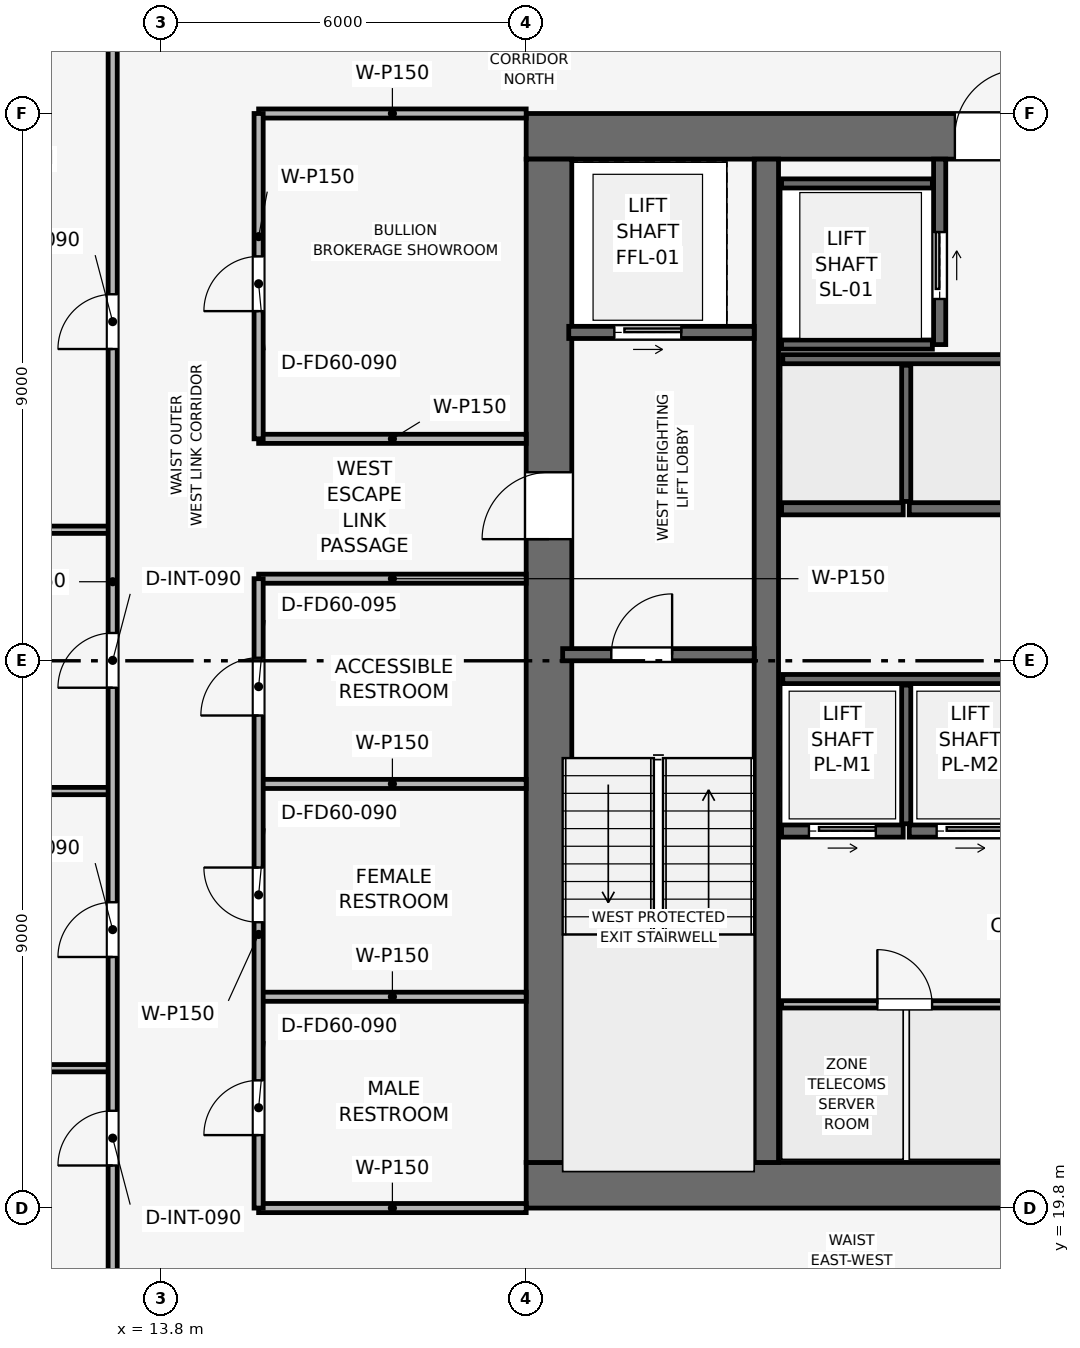
"""IFC4 building model, lengths in metres.
Left out: names, types, materials, properties, quantities, classifications, styles, units other than length and angle.
Written with IfcOpenShell. Run it as: python <this file> out.ifc"""

import sys

from ifc_helpers import new_model, si_unit, direction, frame, frame_2d, origin, place, context, subcontext, project, spatial, rectangle, extrude, element, fill, save


model = new_model("IFC4")
c1 = context("Model", 3, precision=1e-05, world=origin(), true_north=direction((0.0, 1.0)))
c2 = subcontext(c1, "Body", "Model", "MODEL_VIEW")
j1 = project(units=[si_unit("LENGTHUNIT", "METRE"), si_unit("PLANEANGLEUNIT", "RADIAN")], contexts=[c1])
p1 = place(None, origin())
s1 = spatial("IfcSite", under=j1, at=p1, CompositionType="ELEMENT")
p2 = place(p1, origin())
s2 = spatial("IfcBuilding", under=s1, at=p2, CompositionType="ELEMENT")
p3 = place(p2, frame((0.0, 0.0, 229.95)))
s3 = spatial("IfcBuildingStorey", under=s2, at=p3, CompositionType="ELEMENT", Elevation=229.95)
p4 = place(p3, frame((19.8, 20.175, 0.0), z_axis=(0.0, 0.0, 1.0), x_axis=(1.0, 0.0, 0.0)))
e1 = element("IfcWall", 1, at=p4, inside=s3, PredefinedType="SHEAR", context=c2, shape_type="SweptSolid", body=[
    extrude(rectangle(XDim=18.0, YDim=0.75, at=frame_2d((9.0, 0.0))), origin(), (0.0, 0.0, 1.0), 3.75),
])
p5 = place(p4, frame((8.4, 0.0, 0.0)))
e2 = element("IfcOpeningElement", 2, at=p5, cuts=e1, PredefinedType="OPENING", context=c2, shape_type="SweptSolid", body=[
    extrude(rectangle(XDim=1.2, YDim=2.2, at=frame_2d((0.6, 1.1))), frame((0.0, 0.385, 0.0), z_axis=(0.0, -1.0, 0.0), x_axis=(1.0, 0.0, 0.0)), (0.0, 0.0, 1.0), 0.77),
])
p6 = place(p3, frame((19.8, 37.425, 0.0), z_axis=(0.0, 0.0, 1.0), x_axis=(1.0, 0.0, 0.0)))
e3 = element("IfcWall", 3, at=p6, inside=s3, PredefinedType="SHEAR", context=c2, shape_type="SweptSolid", body=[
    extrude(rectangle(XDim=18.0, YDim=0.75, at=frame_2d((9.0, 0.0))), origin(), (0.0, 0.0, 1.0), 3.75),
])
p7 = place(p6, frame((7.05, 0.0, 0.0)))
e4 = element("IfcOpeningElement", 4, at=p7, cuts=e3, PredefinedType="OPENING", context=c2, shape_type="SweptSolid", body=[
    extrude(rectangle(XDim=1.1, YDim=2.15, at=frame_2d((0.55, 1.075))), frame((0.0, 0.385, 0.0), z_axis=(0.0, -1.0, 0.0), x_axis=(1.0, 0.0, 0.0)), (0.0, 0.0, 1.0), 0.77),
])
p8 = place(p3, frame((20.175, 20.55, 0.0), z_axis=(0.0, 0.0, 1.0), x_axis=(0.0, 1.0, 0.0)))
e5 = element("IfcWall", 5, at=p8, inside=s3, PredefinedType="SHEAR", context=c2, shape_type="SweptSolid", body=[
    extrude(rectangle(XDim=16.5, YDim=0.75, at=frame_2d((8.25, 0.0))), origin(), (0.0, 0.0, 1.0), 3.75),
])
p9 = place(p8, frame((10.25, 0.0, 0.0)))
e6 = element("IfcOpeningElement", 6, at=p9, cuts=e5, PredefinedType="OPENING", context=c2, shape_type="SweptSolid", body=[
    extrude(rectangle(XDim=1.1, YDim=2.15, at=frame_2d((0.55, 1.075))), frame((0.0, 0.385, 0.0), z_axis=(0.0, -1.0, 0.0), x_axis=(1.0, 0.0, 0.0)), (0.0, 0.0, 1.0), 0.77),
])
p10 = place(p3, frame((23.75, 20.55, 0.0), z_axis=(0.0, 0.0, 1.0), x_axis=(0.0, 1.0, 0.0)))
e7 = element("IfcWall", 7, at=p10, inside=s3, PredefinedType="SHEAR", context=c2, shape_type="SweptSolid", body=[
    extrude(rectangle(XDim=16.5, YDim=0.4, at=frame_2d((8.25, 0.0))), origin(), (0.0, 0.0, 1.0), 3.75),
])
p11 = place(p3, frame((20.4, 28.9, 0.0), z_axis=(0.0, 0.0, 1.0), x_axis=(1.0, 0.0, 0.0)))
e8 = element("IfcWall", 8, at=p11, inside=s3, PredefinedType="SHEAR", context=c2, shape_type="SweptSolid", body=[
    extrude(rectangle(XDim=3.15, YDim=0.2, at=frame_2d((1.575, 0.0))), origin(), (0.0, 0.0, 1.0), 3.5),
])
p12 = place(p11, frame((0.8, 0.0, 0.0)))
e9 = element("IfcOpeningElement", 9, at=p12, cuts=e8, PredefinedType="OPENING", context=c2, shape_type="SweptSolid", body=[
    extrude(rectangle(XDim=1.0, YDim=2.1, at=frame_2d((0.5, 1.05))), frame((0.0, 0.11, 0.0), z_axis=(0.0, -1.0, 0.0), x_axis=(1.0, 0.0, 0.0)), (0.0, 0.0, 1.0), 0.22),
])
p13 = place(p3, frame((20.5, 34.2, 0.0), z_axis=(0.0, 0.0, 1.0), x_axis=(1.0, 0.0, 0.0)))
e10 = element("IfcWall", 10, at=p13, inside=s3, PredefinedType="SHEAR", context=c2, shape_type="SweptSolid", body=[
    extrude(rectangle(XDim=3.05, YDim=0.2, at=frame_2d((1.525, 0.0))), origin(), (0.0, 0.0, 1.0), 3.5),
])
p14 = place(p13, frame((0.75, 0.0, 0.0)))
e11 = element("IfcOpeningElement", 11, at=p14, cuts=e10, PredefinedType="OPENING", context=c2, shape_type="SweptSolid", body=[
    extrude(rectangle(XDim=1.1, YDim=2.15, at=frame_2d((0.55, 1.075))), frame((0.0, 0.11, 0.0), z_axis=(0.0, -1.0, 0.0), x_axis=(1.0, 0.0, 0.0)), (0.0, 0.0, 1.0), 0.22),
])
p15 = place(p3, frame((26.6, 34.0, 0.0), z_axis=(0.0, 0.0, 1.0), x_axis=(0.0, 1.0, 0.0)))
e12 = element("IfcWall", 12, at=p15, inside=s3, PredefinedType="SHEAR", context=c2, shape_type="SweptSolid", body=[
    extrude(rectangle(XDim=3.05, YDim=0.2, at=frame_2d((1.525, 0.0))), origin(), (0.0, 0.0, 1.0), 3.5),
])
p16 = place(p15, frame((0.75, 0.0, 0.0)))
e13 = element("IfcOpeningElement", 13, at=p16, cuts=e12, PredefinedType="OPENING", context=c2, shape_type="SweptSolid", body=[
    extrude(rectangle(XDim=1.1, YDim=2.15, at=frame_2d((0.55, 1.075))), frame((0.0, 0.11, 0.0), z_axis=(0.0, -1.0, 0.0), x_axis=(1.0, 0.0, 0.0)), (0.0, 0.0, 1.0), 0.22),
])
for number, where, z_axis, x_axis in (
    (14, (24.0, 34.0, 0.0), (0.0, 0.0, 1.0), (1.0, 0.0, 0.0)),
    (15, (24.0, 36.65, 0.0), (0.0, 0.0, 1.0), (1.0, 0.0, 0.0)),
):
    element("IfcWall", number, at=place(p3, frame(where, z_axis=z_axis, x_axis=x_axis)), inside=s3, PredefinedType="SHEAR", context=c2, shape_type="SweptSolid", body=[
        extrude(rectangle(XDim=2.48, YDim=0.15, at=frame_2d((1.24, 0.0))), origin(), (0.0, 0.0, 1.0), 3.5),
    ])
p17 = place(p3, frame((24.0, 26.0, 0.0), z_axis=(0.0, 0.0, 1.0), x_axis=(1.0, 0.0, 0.0)))
e16 = element("IfcWall", 16, at=p17, inside=s3, PredefinedType="SHEAR", context=c2, shape_type="SweptSolid", body=[
    extrude(rectangle(XDim=2.0, YDim=0.2, at=frame_2d((1.0, 0.0))), origin(), (0.0, 0.0, 1.0), 3.5),
])
p18 = place(p17, frame((0.45, 0.0, 0.0)))
e17 = element("IfcOpeningElement", 17, at=p18, cuts=e16, PredefinedType="OPENING", context=c2, shape_type="SweptSolid", body=[
    extrude(rectangle(XDim=1.1, YDim=2.15, at=frame_2d((0.55, 1.075))), frame((0.0, 0.11, 0.0), z_axis=(0.0, -1.0, 0.0), x_axis=(1.0, 0.0, 0.0)), (0.0, 0.0, 1.0), 0.22),
])
p19 = place(p3, frame((26.1, 26.0, 0.0), z_axis=(0.0, 0.0, 1.0), x_axis=(1.0, 0.0, 0.0)))
e18 = element("IfcWall", 18, at=p19, inside=s3, PredefinedType="SHEAR", context=c2, shape_type="SweptSolid", body=[
    extrude(rectangle(XDim=2.0, YDim=0.2, at=frame_2d((1.0, 0.0))), origin(), (0.0, 0.0, 1.0), 3.5),
])
p20 = place(p19, frame((0.45, 0.0, 0.0)))
e19 = element("IfcOpeningElement", 19, at=p20, cuts=e18, PredefinedType="OPENING", context=c2, shape_type="SweptSolid", body=[
    extrude(rectangle(XDim=1.1, YDim=2.15, at=frame_2d((0.55, 1.075))), frame((0.0, 0.11, 0.0), z_axis=(0.0, -1.0, 0.0), x_axis=(1.0, 0.0, 0.0)), (0.0, 0.0, 1.0), 0.22),
])
for number, where, z_axis, x_axis in (
    (20, (24.0, 31.3, 0.0), (0.0, 0.0, 1.0), (1.0, 0.0, 0.0)),
    (21, (26.1, 31.3, 0.0), (0.0, 0.0, 1.0), (1.0, 0.0, 0.0)),
):
    element("IfcWall", number, at=place(p3, frame(where, z_axis=z_axis, x_axis=x_axis)), inside=s3, PredefinedType="SHEAR", context=c2, shape_type="SweptSolid", body=[
        extrude(rectangle(XDim=2.0, YDim=0.2, at=frame_2d((1.0, 0.0))), origin(), (0.0, 0.0, 1.0), 3.5),
    ])
p21 = place(p3, frame((24.02, 28.5, 0.0), z_axis=(0.0, 0.0, 1.0), x_axis=(1.0, 0.0, 0.0)))
e22 = element("IfcWall", 22, at=p21, inside=s3, PredefinedType="SHEAR", context=c2, shape_type="SweptSolid", body=[
    extrude(rectangle(XDim=4.08, YDim=0.15, at=frame_2d((2.04, 0.0))), origin(), (0.0, 0.0, 1.0), 3.5),
])
p22 = place(p3, frame((26.05, 26.12, 0.0), z_axis=(0.0, 0.0, 1.0), x_axis=(0.0, 1.0, 0.0)))
e23 = element("IfcWall", 23, at=p22, inside=s3, PredefinedType="SHEAR", context=c2, shape_type="SweptSolid", body=[
    extrude(rectangle(XDim=2.28, YDim=0.15, at=frame_2d((1.14, 0.0))), origin(), (0.0, 0.0, 1.0), 3.5),
])
p23 = place(p3, frame((24.02, 33.76, 0.0), z_axis=(0.0, 0.0, 1.0), x_axis=(1.0, 0.0, 0.0)))
e24 = element("IfcWall", 24, at=p23, inside=s3, PredefinedType="SHEAR", context=c2, shape_type="SweptSolid", body=[
    extrude(rectangle(XDim=4.08, YDim=0.15, at=frame_2d((2.04, 0.0))), origin(), (0.0, 0.0, 1.0), 3.5),
])
p24 = place(p3, frame((26.05, 31.42, 0.0), z_axis=(0.0, 0.0, 1.0), x_axis=(0.0, 1.0, 0.0)))
e25 = element("IfcWall", 25, at=p24, inside=s3, PredefinedType="SHEAR", context=c2, shape_type="SweptSolid", body=[
    extrude(rectangle(XDim=2.24, YDim=0.15, at=frame_2d((1.12, 0.0))), origin(), (0.0, 0.0, 1.0), 3.5),
])
p25 = place(p3, frame((24.0, 23.15, 0.0), z_axis=(0.0, 0.0, 1.0), x_axis=(1.0, 0.0, 0.0)))
e26 = element("IfcWall", 26, at=p25, inside=s3, PredefinedType="PARTITIONING", context=c2, shape_type="SweptSolid", body=[
    extrude(rectangle(XDim=4.05, YDim=0.12, at=frame_2d((2.025, 0.0))), origin(), (0.0, 0.0, 1.0), 3.5),
])
p26 = place(p25, frame((1.575, 0.0, 0.0)))
e27 = element("IfcOpeningElement", 27, at=p26, cuts=e26, PredefinedType="OPENING", context=c2, shape_type="SweptSolid", body=[
    extrude(rectangle(XDim=0.9, YDim=2.1, at=frame_2d((0.45, 1.05))), frame((0.0, 0.07, 0.0), z_axis=(0.0, -1.0, 0.0), x_axis=(1.0, 0.0, 0.0)), (0.0, 0.0, 1.0), 0.14),
])
p27 = place(p3, frame((15.4, 19.8, 0.0), z_axis=(0.0, 0.0, 1.0), x_axis=(1.0, 0.0, 0.0)))
e28 = element("IfcWall", 28, at=p27, inside=s3, PredefinedType="PARTITIONING", context=c2, shape_type="SweptSolid", body=[
    extrude(rectangle(XDim=4.4, YDim=0.15, at=frame_2d((2.2, 0.0))), origin(), (0.0, 0.0, 1.0), 3.035),
])
for number, where, z_axis, x_axis in (
    (29, (15.4, 23.275, 0.0), (0.0, 0.0, 1.0), (1.0, 0.0, 0.0)),
    (30, (15.4, 26.775, 0.0), (0.0, 0.0, 1.0), (1.0, 0.0, 0.0)),
    (31, (15.4, 30.15, 0.0), (0.0, 0.0, 1.0), (1.0, 0.0, 0.0)),
    (32, (15.4, 32.45, 0.0), (0.0, 0.0, 1.0), (1.0, 0.0, 0.0)),
):
    element("IfcWall", number, at=place(p3, frame(where, z_axis=z_axis, x_axis=x_axis)), inside=s3, PredefinedType="PARTITIONING", context=c2, shape_type="SweptSolid", body=[
        extrude(rectangle(XDim=4.4, YDim=0.15, at=frame_2d((2.2, 0.0))), origin(), (0.0, 0.0, 1.0), 3.5),
    ])
p28 = place(p3, frame((15.4, 37.8, 0.0), z_axis=(0.0, 0.0, 1.0), x_axis=(1.0, 0.0, 0.0)))
e33 = element("IfcWall", 33, at=p28, inside=s3, PredefinedType="PARTITIONING", context=c2, shape_type="SweptSolid", body=[
    extrude(rectangle(XDim=4.4, YDim=0.15, at=frame_2d((2.2, 0.0))), origin(), (0.0, 0.0, 1.0), 3.035),
])
p29 = place(p3, frame((15.4, 19.8, 0.0), z_axis=(0.0, 0.0, 1.0), x_axis=(0.0, 1.0, 0.0)))
e34 = element("IfcWall", 34, at=p29, inside=s3, PredefinedType="PARTITIONING", context=c2, shape_type="SweptSolid", body=[
    extrude(rectangle(XDim=10.35, YDim=0.15, at=frame_2d((5.175, 0.0))), origin(), (0.0, 0.0, 1.0), 3.035),
])
p30 = place(p29, frame((1.2, 0.0, 0.0)))
e35 = element("IfcOpeningElement", 35, at=p30, cuts=e34, PredefinedType="OPENING", context=c2, shape_type="SweptSolid", body=[
    extrude(rectangle(XDim=0.9, YDim=2.1, at=frame_2d((0.45, 1.05))), frame((0.0, 0.085, 0.0), z_axis=(0.0, -1.0, 0.0), x_axis=(1.0, 0.0, 0.0)), (0.0, 0.0, 1.0), 0.17),
])
p31 = place(p29, frame((4.7, 0.0, 0.0)))
e36 = element("IfcOpeningElement", 36, at=p31, cuts=e34, PredefinedType="OPENING", context=c2, shape_type="SweptSolid", body=[
    extrude(rectangle(XDim=0.9, YDim=2.1, at=frame_2d((0.45, 1.05))), frame((0.0, 0.085, 0.0), z_axis=(0.0, -1.0, 0.0), x_axis=(1.0, 0.0, 0.0)), (0.0, 0.0, 1.0), 0.17),
])
p32 = place(p29, frame((8.1, 0.0, 0.0)))
e37 = element("IfcOpeningElement", 37, at=p32, cuts=e34, PredefinedType="OPENING", context=c2, shape_type="SweptSolid", body=[
    extrude(rectangle(XDim=0.95, YDim=2.1, at=frame_2d((0.475, 1.05))), frame((0.0, 0.085, 0.0), z_axis=(0.0, -1.0, 0.0), x_axis=(1.0, 0.0, 0.0)), (0.0, 0.0, 1.0), 0.17),
])
p33 = place(p3, frame((15.4, 32.45, 0.0), z_axis=(0.0, 0.0, 1.0), x_axis=(0.0, 1.0, 0.0)))
e38 = element("IfcWall", 38, at=p33, inside=s3, PredefinedType="PARTITIONING", context=c2, shape_type="SweptSolid", body=[
    extrude(rectangle(XDim=5.35, YDim=0.15, at=frame_2d((2.675, 0.0))), origin(), (0.0, 0.0, 1.0), 3.035),
])
p34 = place(p33, frame((2.1, 0.0, 0.0)))
e39 = element("IfcOpeningElement", 39, at=p34, cuts=e38, PredefinedType="OPENING", context=c2, shape_type="SweptSolid", body=[
    extrude(rectangle(XDim=0.9, YDim=2.1, at=frame_2d((0.45, 1.05))), frame((0.0, 0.085, 0.0), z_axis=(0.0, -1.0, 0.0), x_axis=(1.0, 0.0, 0.0)), (0.0, 0.0, 1.0), 0.17),
])
for number, where, z_axis, x_axis in (
    (40, (1.93, 22.1, 0.0), (0.0, 0.0, 1.0), (1.0, 0.0, 0.0)),
    (41, (1.93, 26.658, 0.0), (0.0, 0.0, 1.0), (1.0, 0.0, 0.0)),
    (42, (1.93, 30.955, 0.0), (0.0, 0.0, 1.0), (1.0, 0.0, 0.0)),
):
    element("IfcWall", number, at=place(p3, frame(where, z_axis=z_axis, x_axis=x_axis)), inside=s3, PredefinedType="PARTITIONING", context=c2, shape_type="SweptSolid", body=[
        extrude(rectangle(XDim=11.07, YDim=0.12, at=frame_2d((5.535, 0.0))), origin(), (0.0, 0.0, 1.0), 2.885),
    ])
p35 = place(p3, frame((13.0, 17.4, 0.0), z_axis=(0.0, 0.0, 1.0), x_axis=(0.0, 1.0, 0.0)))
e43 = element("IfcWall", 43, at=p35, inside=s3, PredefinedType="PARTITIONING", context=c2, shape_type="SweptSolid", body=[
    extrude(rectangle(XDim=22.8, YDim=0.15, at=frame_2d((11.4, 0.0))), origin(), (0.0, 0.0, 1.0), 3.035),
])
p36 = place(p35, frame((3.1, 0.0, 0.0)))
e44 = element("IfcOpeningElement", 44, at=p36, cuts=e43, PredefinedType="OPENING", context=c2, shape_type="SweptSolid", body=[
    extrude(rectangle(XDim=0.9, YDim=2.1, at=frame_2d((0.45, 1.05))), frame((0.0, 0.085, 0.0), z_axis=(0.0, -1.0, 0.0), x_axis=(1.0, 0.0, 0.0)), (0.0, 0.0, 1.0), 0.17),
])
p37 = place(p35, frame((6.529, 0.0, 0.0)))
e45 = element("IfcOpeningElement", 45, at=p37, cuts=e43, PredefinedType="OPENING", context=c2, shape_type="SweptSolid", body=[
    extrude(rectangle(XDim=0.9, YDim=2.1, at=frame_2d((0.45, 1.05))), frame((0.0, 0.085, 0.0), z_axis=(0.0, -1.0, 0.0), x_axis=(1.0, 0.0, 0.0)), (0.0, 0.0, 1.0), 0.17),
])
p38 = place(p35, frame((10.957, 0.0, 0.0)))
e46 = element("IfcOpeningElement", 46, at=p38, cuts=e43, PredefinedType="OPENING", context=c2, shape_type="SweptSolid", body=[
    extrude(rectangle(XDim=0.9, YDim=2.1, at=frame_2d((0.45, 1.05))), frame((0.0, 0.085, 0.0), z_axis=(0.0, -1.0, 0.0), x_axis=(1.0, 0.0, 0.0)), (0.0, 0.0, 1.0), 0.17),
])
p39 = place(p35, frame((16.527, 0.0, 0.0)))
e47 = element("IfcOpeningElement", 47, at=p39, cuts=e43, PredefinedType="OPENING", context=c2, shape_type="SweptSolid", body=[
    extrude(rectangle(XDim=0.9, YDim=2.1, at=frame_2d((0.45, 1.05))), frame((0.0, 0.085, 0.0), z_axis=(0.0, -1.0, 0.0), x_axis=(1.0, 0.0, 0.0)), (0.0, 0.0, 1.0), 0.17),
])
p40 = place(p12, origin())
e48 = element("IfcDoor", 48, at=p40, inside=s3, OperationType="SINGLE_SWING_RIGHT", PredefinedType="DOOR", context=c2, shape_type="SweptSolid", body=[
    extrude(rectangle(XDim=1.0, YDim=2.1, at=frame_2d((0.5, 1.05))), frame((0.0, 0.025, 0.0), z_axis=(0.0, -1.0, 0.0), x_axis=(1.0, 0.0, 0.0)), (0.0, 0.0, 1.0), 0.05),
])
fill(e9, e48)
p41 = place(p14, origin())
e49 = element("IfcDoor", 49, at=p41, inside=s3, OperationType="SLIDING_TO_RIGHT", PredefinedType="DOOR", context=c2, shape_type="SweptSolid", body=[
    extrude(rectangle(XDim=1.1, YDim=2.15, at=frame_2d((0.55, 1.075))), frame((0.0, 0.025, 0.0), z_axis=(0.0, -1.0, 0.0), x_axis=(1.0, 0.0, 0.0)), (0.0, 0.0, 1.0), 0.05),
])
fill(e11, e49)
p42 = place(p16, origin())
e50 = element("IfcDoor", 50, at=p42, inside=s3, OperationType="SLIDING_TO_RIGHT", PredefinedType="DOOR", context=c2, shape_type="SweptSolid", body=[
    extrude(rectangle(XDim=1.1, YDim=2.15, at=frame_2d((0.55, 1.075))), frame((0.0, 0.025, 0.0), z_axis=(0.0, -1.0, 0.0), x_axis=(1.0, 0.0, 0.0)), (0.0, 0.0, 1.0), 0.05),
])
fill(e13, e50)
p43 = place(p18, origin())
e51 = element("IfcDoor", 51, at=p43, inside=s3, OperationType="SLIDING_TO_RIGHT", PredefinedType="DOOR", context=c2, shape_type="SweptSolid", body=[
    extrude(rectangle(XDim=1.1, YDim=2.15, at=frame_2d((0.55, 1.075))), frame((0.0, 0.025, 0.0), z_axis=(0.0, -1.0, 0.0), x_axis=(1.0, 0.0, 0.0)), (0.0, 0.0, 1.0), 0.05),
])
fill(e17, e51)
p44 = place(p20, origin())
e52 = element("IfcDoor", 52, at=p44, inside=s3, OperationType="SLIDING_TO_RIGHT", PredefinedType="DOOR", context=c2, shape_type="SweptSolid", body=[
    extrude(rectangle(XDim=1.1, YDim=2.15, at=frame_2d((0.55, 1.075))), frame((0.0, 0.025, 0.0), z_axis=(0.0, -1.0, 0.0), x_axis=(1.0, 0.0, 0.0)), (0.0, 0.0, 1.0), 0.05),
])
fill(e19, e52)
p45 = place(p26, origin())
e53 = element("IfcDoor", 53, at=p45, inside=s3, OperationType="SINGLE_SWING_LEFT", PredefinedType="DOOR", context=c2, shape_type="SweptSolid", body=[
    extrude(rectangle(XDim=0.9, YDim=2.1, at=frame_2d((0.45, 1.05))), frame((0.0, 0.025, 0.0), z_axis=(0.0, -1.0, 0.0), x_axis=(1.0, 0.0, 0.0)), (0.0, 0.0, 1.0), 0.05),
])
fill(e27, e53)
p46 = place(p30, origin())
e54 = element("IfcDoor", 54, at=p46, inside=s3, OperationType="SINGLE_SWING_LEFT", PredefinedType="DOOR", context=c2, shape_type="SweptSolid", body=[
    extrude(rectangle(XDim=0.9, YDim=2.1, at=frame_2d((0.45, 1.05))), frame((0.0, 0.025, 0.0), z_axis=(0.0, -1.0, 0.0), x_axis=(1.0, 0.0, 0.0)), (0.0, 0.0, 1.0), 0.05),
])
fill(e35, e54)
p47 = place(p31, origin())
e55 = element("IfcDoor", 55, at=p47, inside=s3, OperationType="SINGLE_SWING_RIGHT", PredefinedType="DOOR", context=c2, shape_type="SweptSolid", body=[
    extrude(rectangle(XDim=0.9, YDim=2.1, at=frame_2d((0.45, 1.05))), frame((0.0, 0.025, 0.0), z_axis=(0.0, -1.0, 0.0), x_axis=(1.0, 0.0, 0.0)), (0.0, 0.0, 1.0), 0.05),
])
fill(e36, e55)
p48 = place(p32, origin())
e56 = element("IfcDoor", 56, at=p48, inside=s3, OperationType="SINGLE_SWING_LEFT", PredefinedType="DOOR", context=c2, shape_type="SweptSolid", body=[
    extrude(rectangle(XDim=0.95, YDim=2.1, at=frame_2d((0.475, 1.05))), frame((0.0, 0.025, 0.0), z_axis=(0.0, -1.0, 0.0), x_axis=(1.0, 0.0, 0.0)), (0.0, 0.0, 1.0), 0.05),
])
fill(e37, e56)
p49 = place(p34, origin())
e57 = element("IfcDoor", 57, at=p49, inside=s3, OperationType="SINGLE_SWING_LEFT", PredefinedType="DOOR", context=c2, shape_type="SweptSolid", body=[
    extrude(rectangle(XDim=0.9, YDim=2.1, at=frame_2d((0.45, 1.05))), frame((0.0, 0.025, 0.0), z_axis=(0.0, -1.0, 0.0), x_axis=(1.0, 0.0, 0.0)), (0.0, 0.0, 1.0), 0.05),
])
fill(e39, e57)
p50 = place(p36, origin())
e58 = element("IfcDoor", 58, at=p50, inside=s3, OperationType="SINGLE_SWING_LEFT", PredefinedType="DOOR", context=c2, shape_type="SweptSolid", body=[
    extrude(rectangle(XDim=0.9, YDim=2.1, at=frame_2d((0.45, 1.05))), frame((0.0, 0.025, 0.0), z_axis=(0.0, -1.0, 0.0), x_axis=(1.0, 0.0, 0.0)), (0.0, 0.0, 1.0), 0.05),
])
fill(e44, e58)
p51 = place(p37, origin())
e59 = element("IfcDoor", 59, at=p51, inside=s3, OperationType="SINGLE_SWING_LEFT", PredefinedType="DOOR", context=c2, shape_type="SweptSolid", body=[
    extrude(rectangle(XDim=0.9, YDim=2.1, at=frame_2d((0.45, 1.05))), frame((0.0, 0.025, 0.0), z_axis=(0.0, -1.0, 0.0), x_axis=(1.0, 0.0, 0.0)), (0.0, 0.0, 1.0), 0.05),
])
fill(e45, e59)
p52 = place(p38, origin())
e60 = element("IfcDoor", 60, at=p52, inside=s3, OperationType="SINGLE_SWING_LEFT", PredefinedType="DOOR", context=c2, shape_type="SweptSolid", body=[
    extrude(rectangle(XDim=0.9, YDim=2.1, at=frame_2d((0.45, 1.05))), frame((0.0, 0.025, 0.0), z_axis=(0.0, -1.0, 0.0), x_axis=(1.0, 0.0, 0.0)), (0.0, 0.0, 1.0), 0.05),
])
fill(e46, e60)
p53 = place(p39, origin())
e61 = element("IfcDoor", 61, at=p53, inside=s3, OperationType="SINGLE_SWING_LEFT", PredefinedType="DOOR", context=c2, shape_type="SweptSolid", body=[
    extrude(rectangle(XDim=0.9, YDim=2.1, at=frame_2d((0.45, 1.05))), frame((0.0, 0.025, 0.0), z_axis=(0.0, -1.0, 0.0), x_axis=(1.0, 0.0, 0.0)), (0.0, 0.0, 1.0), 0.05),
])
fill(e47, e61)
p54 = place(p9, origin())
e62 = element("IfcDoor", 62, at=p54, inside=s3, OperationType="SINGLE_SWING_LEFT", PredefinedType="DOOR", context=c2, shape_type="SweptSolid", body=[
    extrude(rectangle(XDim=1.1, YDim=2.15, at=frame_2d((0.55, 1.075))), frame((0.0, 0.025, 0.0), z_axis=(0.0, -1.0, 0.0), x_axis=(1.0, 0.0, 0.0)), (0.0, 0.0, 1.0), 0.05),
])
fill(e6, e62)
p55 = place(p7, origin())
e63 = element("IfcDoor", 63, at=p55, inside=s3, OperationType="SINGLE_SWING_RIGHT", PredefinedType="DOOR", context=c2, shape_type="SweptSolid", body=[
    extrude(rectangle(XDim=1.1, YDim=2.15, at=frame_2d((0.55, 1.075))), frame((0.0, 0.025, 0.0), z_axis=(0.0, -1.0, 0.0), x_axis=(1.0, 0.0, 0.0)), (0.0, 0.0, 1.0), 0.05),
])
fill(e4, e63)
save(model, sys.argv[1])
